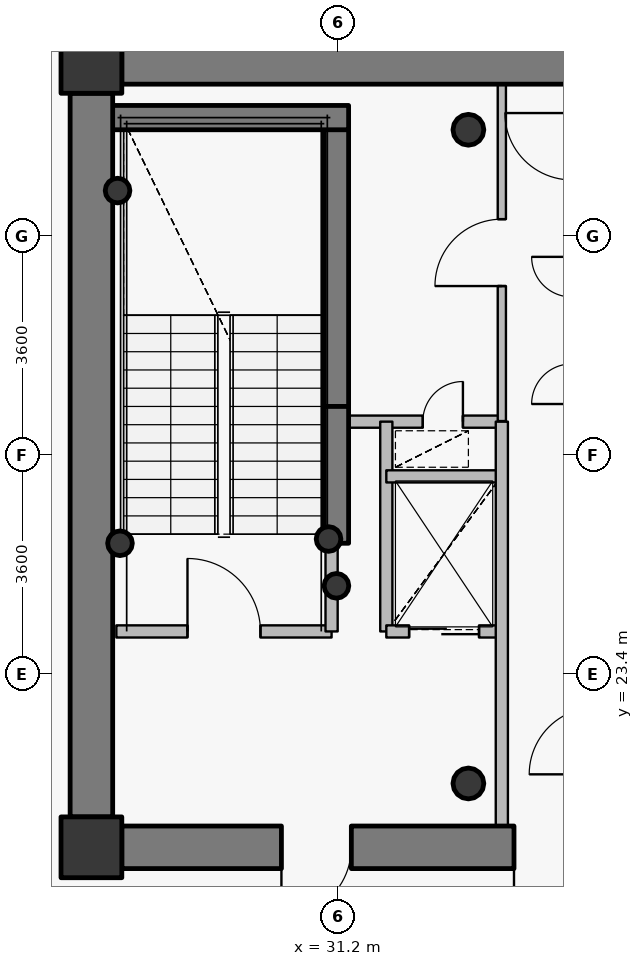
"""IFC4 building model, lengths in metres.
Left out: names, types, materials, properties, quantities, classifications, styles, units other than length and angle.
Written with IfcOpenShell. Run it as: python <this file> out.ifc"""

import sys

from ifc_helpers import new_model, si_unit, direction, frame, frame_2d, origin, origin_2d, place, context, subcontext, project, spatial, rectangle, hollow_circle, extrude, source, transform, mapped, element, fill, save


model = new_model("IFC4")
c1 = context("Model", 3, precision=1e-05, world=origin(), true_north=direction((0.0, 1.0)))
c2 = subcontext(c1, "Body", "Model", "MODEL_VIEW")
j1 = project(units=[si_unit("LENGTHUNIT", "METRE"), si_unit("PLANEANGLEUNIT", "RADIAN")], contexts=[c1])
p1 = place(None, origin())
s1 = spatial("IfcSite", under=j1, at=p1, CompositionType="ELEMENT")
p2 = place(p1, origin())
s2 = spatial("IfcBuilding", under=s1, at=p2, CompositionType="ELEMENT")
p3 = place(p2, frame((0.0, 0.0, 280.5)))
s3 = spatial("IfcBuildingStorey", under=s2, at=p3, CompositionType="ELEMENT", Elevation=280.5)
for number, where, z_axis, x_axis in (
    (1, (27.15, 20.55, 0.0), (0.0, 0.0, 1.0), (1.0, 0.0, 0.0)),
    (2, (27.15, 33.45, 0.0), (0.0, 0.0, 1.0), (1.0, 0.0, 0.0)),
):
    element("IfcColumn", number, at=place(p3, frame(where, z_axis=z_axis, x_axis=x_axis)), inside=s3, PredefinedType="COLUMN", context=c2, shape_type="SweptSolid", body=[
        extrude(rectangle(XDim=1.0, YDim=1.0, at=origin_2d()), origin(), (0.0, 0.0, 1.0), 3.75),
    ])
for number, where, z_axis, x_axis in (
    (3, (33.35, 21.6, 0.0), (0.0, 0.0, 1.0), (1.0, 0.0, 0.0)),
    (4, (33.35, 32.35, 0.0), (0.0, 0.0, 1.0), (1.0, 0.0, 0.0)),
):
    element("IfcColumn", number, at=place(p3, frame(where, z_axis=z_axis, x_axis=x_axis)), inside=s3, PredefinedType="COLUMN", context=c2, shape_type="SweptSolid", body=[
        extrude(hollow_circle(Radius=0.254, WallThickness=0.02, at=origin_2d()), origin(), (0.0, 0.0, 1.0), 3.75),
    ])
p4 = place(p3, frame((31.18, 27.8, 0.0), z_axis=(0.0, 0.0, 1.0), x_axis=(0.0, 1.0, 0.0)))
e5 = element("IfcWall", 5, at=p4, inside=s3, PredefinedType="SHEAR", context=c2, shape_type="SweptSolid", body=[
    extrude(rectangle(XDim=4.75, YDim=0.4, at=frame_2d((2.375, 0.0))), origin(), (0.0, 0.0, 1.0), 3.75),
])
p5 = place(p3, frame((27.25, 32.55, 0.0), z_axis=(0.0, 0.0, 1.0), x_axis=(1.0, 0.0, 0.0)))
e6 = element("IfcWall", 6, at=p5, inside=s3, PredefinedType="SHEAR", context=c2, shape_type="SweptSolid", body=[
    extrude(rectangle(XDim=4.13, YDim=0.4, at=frame_2d((2.065, 0.0))), origin(), (0.0, 0.0, 1.0), 3.75),
])
for number, where, z_axis, x_axis in (
    (7, (27.58, 31.35, 0.0), (0.0, 0.0, 1.0), (1.0, 0.0, 0.0)),
    (8, (31.05, 25.62, 0.0), (0.0, 0.0, 1.0), (1.0, 0.0, 0.0)),
    (9, (31.18, 24.85, 0.0), (0.0, 0.0, 1.0), (1.0, 0.0, 0.0)),
    (10, (27.62, 25.55, 0.0), (0.0, 0.0, 1.0), (1.0, 0.0, 0.0)),
):
    element("IfcColumn", number, at=place(p3, frame(where, z_axis=z_axis, x_axis=x_axis)), inside=s3, PredefinedType="COLUMN", context=c2, shape_type="SweptSolid", body=[
        extrude(hollow_circle(Radius=0.203, WallThickness=0.016, at=origin_2d()), origin(), (0.0, 0.0, 1.0), 3.75),
    ])
p6 = place(p3, frame((27.65, 33.45, 0.0), z_axis=(0.0, 0.0, 1.0), x_axis=(1.0, 0.0, 0.0)))
e11 = element("IfcWall", 11, at=p6, inside=s3, PredefinedType="SHEAR", context=c2, shape_type="SweptSolid", body=[
    extrude(rectangle(XDim=16.7, YDim=0.7, at=frame_2d((8.35, 0.0))), origin(), (0.0, 0.0, 1.0), 3.05),
])
p7 = place(p6, frame((12.775, 0.0, 0.0)))
e12 = element("IfcOpeningElement", 12, at=p7, cuts=e11, PredefinedType="OPENING", context=c2, shape_type="SweptSolid", body=[
    extrude(rectangle(XDim=1.15, YDim=2.15, at=origin_2d()), frame((0.575, 0.36, 1.075), z_axis=(0.0, -1.0, 0.0), x_axis=(1.0, 0.0, 0.0)), (0.0, 0.0, 1.0), 0.72),
])
p8 = place(p3, frame((44.35, 20.55, 0.0), z_axis=(0.0, 0.0, 1.0), x_axis=(-1.0, 0.0, 0.0)))
e13 = element("IfcWall", 13, at=p8, inside=s3, PredefinedType="SHEAR", context=c2, shape_type="SweptSolid", body=[
    extrude(rectangle(XDim=16.7, YDim=0.7, at=frame_2d((8.35, 0.0))), origin(), (0.0, 0.0, 1.0), 3.05),
])
p9 = place(p8, frame((12.925, 0.0, 0.0)))
e14 = element("IfcOpeningElement", 14, at=p9, cuts=e13, PredefinedType="OPENING", context=c2, shape_type="SweptSolid", body=[
    extrude(rectangle(XDim=1.15, YDim=2.15, at=origin_2d()), frame((0.575, 0.36, 1.075), z_axis=(0.0, -1.0, 0.0), x_axis=(1.0, 0.0, 0.0)), (0.0, 0.0, 1.0), 0.72),
])
p10 = place(p8, frame((9.1, 0.0, 0.0)))
e15 = element("IfcOpeningElement", 15, at=p10, cuts=e13, PredefinedType="OPENING", context=c2, shape_type="SweptSolid", body=[
    extrude(rectangle(XDim=1.15, YDim=2.15, at=origin_2d()), frame((0.575, 0.36, 1.075), z_axis=(0.0, -1.0, 0.0), x_axis=(1.0, 0.0, 0.0)), (0.0, 0.0, 1.0), 0.72),
])
p11 = place(p3, frame((27.15, 21.05, 0.0), z_axis=(0.0, 0.0, 1.0), x_axis=(0.0, 1.0, 0.0)))
e16 = element("IfcWall", 16, at=p11, inside=s3, PredefinedType="SHEAR", context=c2, shape_type="SweptSolid", body=[
    extrude(rectangle(XDim=11.9, YDim=0.7, at=frame_2d((5.95, 0.0))), origin(), (0.0, 0.0, 1.0), 3.05),
])
p12 = place(p3, frame((31.18, 25.55, 0.0), z_axis=(0.0, 0.0, 1.0), x_axis=(0.0, 1.0, 0.0)))
e17 = element("IfcWall", 17, at=p12, inside=s3, PredefinedType="SHEAR", context=c2, shape_type="SweptSolid", body=[
    extrude(rectangle(XDim=2.25, YDim=0.4, at=frame_2d((1.125, 0.0))), origin(), (0.0, 0.0, 1.0), 3.1),
])
p13 = place(p3, frame((27.56, 24.1, 0.0), z_axis=(0.0, 0.0, 1.0), x_axis=(1.0, 0.0, 0.0)))
e18 = element("IfcWall", 18, at=p13, inside=s3, PredefinedType="PARTITIONING", context=c2, shape_type="SweptSolid", body=[
    extrude(rectangle(XDim=3.54, YDim=0.2, at=frame_2d((1.77, 0.0))), origin(), (0.0, 0.0, 1.0), 3.5),
])
p14 = place(p13, frame((1.17, 0.0, 0.0)))
e19 = element("IfcOpeningElement", 19, at=p14, cuts=e18, PredefinedType="OPENING", context=c2, shape_type="SweptSolid", body=[
    extrude(rectangle(XDim=1.2, YDim=2.15, at=origin_2d()), frame((0.6, 0.11, 1.075), z_axis=(0.0, -1.0, 0.0), x_axis=(1.0, 0.0, 0.0)), (0.0, 0.0, 1.0), 0.22),
])
p15 = place(p3, frame((31.1, 24.1, 0.0), z_axis=(0.0, 0.0, 1.0), x_axis=(0.0, 1.0, 0.0)))
e20 = element("IfcWall", 20, at=p15, inside=s3, PredefinedType="PARTITIONING", context=c2, shape_type="SweptSolid", body=[
    extrude(rectangle(XDim=1.44, YDim=0.2, at=frame_2d((0.72, 0.0))), origin(), (0.0, 0.0, 1.0), 3.5),
])
p16 = place(p3, frame((31.1, 27.55, 0.0), z_axis=(0.0, 0.0, 1.0), x_axis=(1.0, 0.0, 0.0)))
e21 = element("IfcWall", 21, at=p16, inside=s3, PredefinedType="PARTITIONING", context=c2, shape_type="SweptSolid", body=[
    extrude(rectangle(XDim=2.8, YDim=0.2, at=frame_2d((1.4, 0.0))), origin(), (0.0, 0.0, 1.0), 3.085),
])
p17 = place(p16, frame((1.5, 0.0, 0.0)))
e22 = element("IfcOpeningElement", 22, at=p17, cuts=e21, PredefinedType="OPENING", context=c2, shape_type="SweptSolid", body=[
    extrude(rectangle(XDim=0.66, YDim=2.05, at=origin_2d()), frame((0.33, 0.11, 1.025), z_axis=(0.0, -1.0, 0.0), x_axis=(1.0, 0.0, 0.0)), (0.0, 0.0, 1.0), 0.22),
])
p18 = place(p3, frame((32.0, 24.1, 0.0), z_axis=(0.0, 0.0, 1.0), x_axis=(0.0, 1.0, 0.0)))
e23 = element("IfcWall", 23, at=p18, inside=s3, PredefinedType="PARTITIONING", context=c2, shape_type="SweptSolid", body=[
    extrude(rectangle(XDim=3.45, YDim=0.2, at=frame_2d((1.725, 0.0))), origin(), (0.0, 0.0, 1.0), 3.5),
])
p19 = place(p3, frame((32.0, 24.1, 0.0), z_axis=(0.0, 0.0, 1.0), x_axis=(1.0, 0.0, 0.0)))
e24 = element("IfcWall", 24, at=p19, inside=s3, PredefinedType="PARTITIONING", context=c2, shape_type="SweptSolid", body=[
    extrude(rectangle(XDim=1.9, YDim=0.2, at=frame_2d((0.95, 0.0))), origin(), (0.0, 0.0, 1.0), 3.085),
])
p20 = place(p19, frame((0.375, 0.0, 0.0)))
e25 = element("IfcOpeningElement", 25, at=p20, cuts=e24, PredefinedType="OPENING", context=c2, shape_type="SweptSolid", body=[
    extrude(rectangle(XDim=1.15, YDim=2.15, at=origin_2d()), frame((0.575, 0.11, 1.075), z_axis=(0.0, -1.0, 0.0), x_axis=(1.0, 0.0, 0.0)), (0.0, 0.0, 1.0), 0.22),
])
p21 = place(p3, frame((32.0, 26.65, 0.0), z_axis=(0.0, 0.0, 1.0), x_axis=(1.0, 0.0, 0.0)))
e26 = element("IfcWall", 26, at=p21, inside=s3, PredefinedType="PARTITIONING", context=c2, shape_type="SweptSolid", body=[
    extrude(rectangle(XDim=1.9, YDim=0.2, at=frame_2d((0.95, 0.0))), origin(), (0.0, 0.0, 1.0), 3.085),
])
p22 = place(p3, frame((33.9, 20.9, 0.0), z_axis=(0.0, 0.0, 1.0), x_axis=(0.0, 1.0, 0.0)))
e27 = element("IfcWall", 27, at=p22, inside=s3, PredefinedType="PARTITIONING", context=c2, shape_type="SweptSolid", body=[
    extrude(rectangle(XDim=6.65, YDim=0.2, at=frame_2d((3.325, 0.0))), origin(), (0.0, 0.0, 1.0), 3.085),
])
p23 = place(p3, frame((33.9, 27.56, 0.0), z_axis=(0.0, 0.0, 1.0), x_axis=(0.0, 1.0, 0.0)))
e28 = element("IfcWall", 28, at=p23, inside=s3, PredefinedType="PARTITIONING", context=c2, shape_type="SweptSolid", body=[
    extrude(rectangle(XDim=5.54, YDim=0.135, at=frame_2d((2.77, 0.0))), origin(), (0.0, 0.0, 1.0), 3.085),
])
p24 = place(p23, frame((2.22, 0.0, 0.0)))
e29 = element("IfcOpeningElement", 29, at=p24, cuts=e28, PredefinedType="OPENING", context=c2, shape_type="SweptSolid", body=[
    extrude(rectangle(XDim=1.1, YDim=2.15, at=origin_2d()), frame((0.55, 0.078, 1.075), z_axis=(0.0, -1.0, 0.0), x_axis=(1.0, 0.0, 0.0)), (0.0, 0.0, 1.0), 0.155),
])
p25 = place(p3, frame((26.8, 33.492, 0.0), z_axis=(0.0, 0.0, 1.0), x_axis=(0.0, -1.0, 0.0)))
e30 = element("IfcWall", 30, at=p25, inside=s3, PredefinedType="PARTITIONING", context=c2, shape_type="SweptSolid", body=[
    extrude(rectangle(XDim=0.532, YDim=0.135, at=frame_2d((0.266, 0.0))), origin(), (0.0, 0.0, 1.0), 3.5),
])
p26 = place(p3, frame((26.8, 21.04, 0.0), z_axis=(0.0, 0.0, 1.0), x_axis=(0.0, -1.0, 0.0)))
e31 = element("IfcWall", 31, at=p26, inside=s3, PredefinedType="PARTITIONING", context=c2, shape_type="SweptSolid", body=[
    extrude(rectangle(XDim=0.84, YDim=0.135, at=frame_2d((0.42, 0.0))), origin(), (0.0, 0.0, 1.0), 3.035),
])
p27 = place(p3, frame((27.107, 20.2, 0.0), z_axis=(0.0, 0.0, 1.0), x_axis=(1.0, 0.0, 0.0)))
e32 = element("IfcWall", 32, at=p27, inside=s3, PredefinedType="PARTITIONING", context=c2, shape_type="SweptSolid", body=[
    extrude(rectangle(XDim=0.532, YDim=0.135, at=frame_2d((0.266, 0.0))), origin(), (0.0, 0.0, 1.0), 3.035),
])
m1 = source(origin(), c2, "Body", "SweptSolid", [
    extrude(rectangle(XDim=1.15, YDim=2.15, at=origin_2d()), frame((0.575, 0.025, 1.075), z_axis=(0.0, -1.0, 0.0), x_axis=(1.0, 0.0, 0.0)), (0.0, 0.0, 1.0), 0.05),
])
p28 = place(p9, origin())
e33 = element("IfcDoor", 33, at=p28, inside=s3, OperationType="SINGLE_SWING_RIGHT", PredefinedType="DOOR", context=c2, shape_type="MappedRepresentation", body=[
    mapped(m1, transform((0.0, 0.0, 0.0), x_axis=(1.0, 0.0, 0.0), y_axis=(0.0, 1.0, 0.0), z_axis=(0.0, 0.0, 1.0), scale=1.0)),
])
fill(e14, e33)
p29 = place(p10, origin())
e34 = element("IfcDoor", 34, at=p29, inside=s3, OperationType="SINGLE_SWING_RIGHT", PredefinedType="DOOR", context=c2, shape_type="MappedRepresentation", body=[
    mapped(m1, transform((0.0, 0.0, 0.0), x_axis=(1.0, 0.0, 0.0), y_axis=(0.0, 1.0, 0.0), z_axis=(0.0, 0.0, 1.0), scale=1.0)),
])
fill(e15, e34)
m2 = source(origin(), c2, "Body", "SweptSolid", [
    extrude(rectangle(XDim=1.2, YDim=2.15, at=origin_2d()), frame((0.6, 0.025, 1.075), z_axis=(0.0, -1.0, 0.0), x_axis=(1.0, 0.0, 0.0)), (0.0, 0.0, 1.0), 0.05),
])
p30 = place(p14, origin())
e35 = element("IfcDoor", 35, at=p30, inside=s3, OperationType="SINGLE_SWING_LEFT", PredefinedType="DOOR", context=c2, shape_type="MappedRepresentation", body=[
    mapped(m2, transform((0.0, 0.0, 0.0), x_axis=(1.0, 0.0, 0.0), y_axis=(0.0, 1.0, 0.0), z_axis=(0.0, 0.0, 1.0), scale=1.0)),
])
fill(e19, e35)
m3 = source(origin(), c2, "Body", "SweptSolid", [
    extrude(rectangle(XDim=1.15, YDim=2.15, at=origin_2d()), frame((0.575, 0.025, 1.075), z_axis=(0.0, -1.0, 0.0), x_axis=(1.0, 0.0, 0.0)), (0.0, 0.0, 1.0), 0.05),
])
p31 = place(p20, origin())
e36 = element("IfcDoor", 36, at=p31, inside=s3, OperationType="DOUBLE_DOOR_SLIDING", PredefinedType="USERDEFINED", context=c2, shape_type="MappedRepresentation", body=[
    mapped(m3, transform((0.0, 0.0, 0.0), x_axis=(1.0, 0.0, 0.0), y_axis=(0.0, 1.0, 0.0), z_axis=(0.0, 0.0, 1.0), scale=1.0)),
])
fill(e25, e36)
m4 = source(origin(), c2, "Body", "SweptSolid", [
    extrude(rectangle(XDim=1.1, YDim=2.15, at=origin_2d()), frame((0.55, 0.025, 1.075), z_axis=(0.0, -1.0, 0.0), x_axis=(1.0, 0.0, 0.0)), (0.0, 0.0, 1.0), 0.05),
])
p32 = place(p24, origin())
e37 = element("IfcDoor", 37, at=p32, inside=s3, OperationType="SINGLE_SWING_LEFT", PredefinedType="DOOR", context=c2, shape_type="MappedRepresentation", body=[
    mapped(m4, transform((0.0, 0.0, 0.0), x_axis=(1.0, 0.0, 0.0), y_axis=(0.0, 1.0, 0.0), z_axis=(0.0, 0.0, 1.0), scale=1.0)),
])
fill(e29, e37)
m5 = source(origin(), c2, "Body", "SweptSolid", [
    extrude(rectangle(XDim=0.66, YDim=2.05, at=origin_2d()), frame((0.33, 0.025, 1.025), z_axis=(0.0, -1.0, 0.0), x_axis=(1.0, 0.0, 0.0)), (0.0, 0.0, 1.0), 0.05),
])
p33 = place(p17, origin())
e38 = element("IfcDoor", 38, at=p33, inside=s3, OperationType="SINGLE_SWING_RIGHT", PredefinedType="USERDEFINED", context=c2, shape_type="MappedRepresentation", body=[
    mapped(m5, transform((0.0, 0.0, 0.0), x_axis=(1.0, 0.0, 0.0), y_axis=(0.0, 1.0, 0.0), z_axis=(0.0, 0.0, 1.0), scale=1.0)),
])
fill(e22, e38)
save(model, sys.argv[1])
